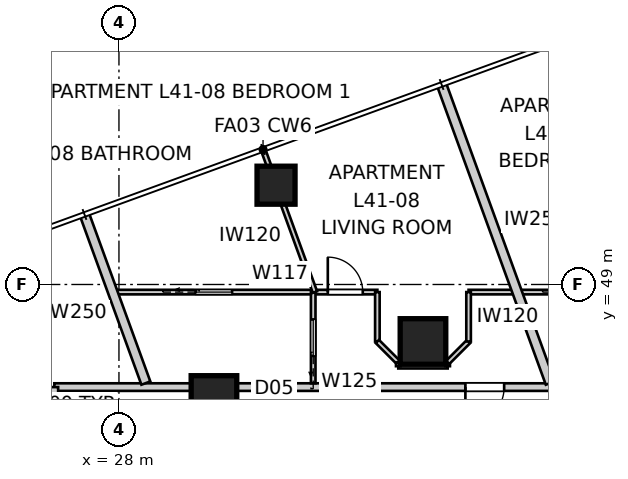
"""IFC4 building model, lengths in metres.
Left out: names, types, materials, properties, quantities, classifications, styles, units other than length and angle.
Written with IfcOpenShell. Run it as: python <this file> out.ifc"""

import sys

from ifc_helpers import new_model, si_unit, direction, frame, frame_2d, origin, origin_2d, place, context, subcontext, project, spatial, rectangle, extrude, element, fill, save


model = new_model("IFC4")
c1 = context("Model", 3, precision=1e-05, world=origin(), true_north=direction((0.0, 1.0)))
c2 = subcontext(c1, "Body", "Model", "MODEL_VIEW")
j1 = project(units=[si_unit("LENGTHUNIT", "METRE"), si_unit("PLANEANGLEUNIT", "RADIAN")], contexts=[c1])
p1 = place(None, origin())
s1 = spatial("IfcSite", under=j1, at=p1, CompositionType="ELEMENT")
p2 = place(p1, origin())
s2 = spatial("IfcBuilding", under=s1, at=p2, CompositionType="ELEMENT")
p3 = place(p2, frame((0.0, 0.0, 150.6)))
s3 = spatial("IfcBuildingStorey", under=s2, at=p3, CompositionType="ELEMENT", Elevation=150.6)
p4 = place(p3, frame((32.134, 51.613, 0.0), z_axis=(0.0, 0.0, 1.0), x_axis=(1.0, 0.0, 0.0)))
e1 = element("IfcColumn", 1, at=p4, inside=s3, PredefinedType="COLUMN", context=c2, shape_type="SweptSolid", body=[
    extrude(rectangle(XDim=1.0, YDim=1.0, at=origin_2d()), origin(), (0.0, 0.0, 1.0), 3.4),
])
for number, where, z_axis, x_axis in (
    (2, (36.0, 47.5, 0.0), (0.0, 0.0, 1.0), (1.0, 0.0, 0.0)),
    (3, (30.5, 46.0, 0.0), (0.0, 0.0, 1.0), (1.0, 0.0, 0.0)),
):
    element("IfcColumn", number, at=place(p3, frame(where, z_axis=z_axis, x_axis=x_axis)), inside=s3, PredefinedType="COLUMN", context=c2, shape_type="SweptSolid", body=[
        extrude(rectangle(XDim=1.2, YDim=1.2, at=origin_2d()), origin(), (0.0, 0.0, 1.0), 3.4),
    ])
p5 = place(p3, frame((47.558, 46.3, 0.0), z_axis=(0.0, 0.0, 1.0), x_axis=(-1.0, 0.0, 0.0)))
e4 = element("IfcWall", 4, at=p5, inside=s3, PredefinedType="PARTITIONING", context=c2, shape_type="SweptSolid", body=[
    extrude(rectangle(XDim=15.117, YDim=0.2, at=frame_2d((7.558, 0.0))), origin(), (0.0, 0.0, 1.0), 3.25),
])
p6 = place(p5, frame((9.422, 0.0, 0.0)))
e5 = element("IfcOpeningElement", 5, at=p6, cuts=e4, PredefinedType="OPENING", context=c2, shape_type="SweptSolid", body=[
    extrude(rectangle(XDim=1.02, YDim=2.34, at=frame_2d((0.51, 1.17))), frame((0.0, 0.11, 0.0), z_axis=(0.0, -1.0, 0.0), x_axis=(1.0, 0.0, 0.0)), (0.0, 0.0, 1.0), 0.22),
])
p7 = place(p3, frame((32.442, 46.3, 0.0), z_axis=(0.0, 0.0, 1.0), x_axis=(-1.0, 0.0, 0.0)))
e6 = element("IfcWall", 6, at=p7, inside=s3, PredefinedType="PARTITIONING", context=c2, shape_type="SweptSolid", body=[
    extrude(rectangle(XDim=1.683, YDim=0.2, at=frame_2d((0.842, 0.0))), origin(), (0.0, 0.0, 1.0), 2.55),
])
p8 = place(p3, frame((30.758, 46.3, 0.0), z_axis=(0.0, 0.0, 1.0), x_axis=(-1.0, 0.0, 0.0)))
e7 = element("IfcWall", 7, at=p8, inside=s3, PredefinedType="PARTITIONING", context=c2, shape_type="SweptSolid", body=[
    extrude(rectangle(XDim=4.458, YDim=0.2, at=frame_2d((2.229, 0.0))), origin(), (0.0, 0.0, 1.0), 3.25),
])
p9 = place(p3, frame((26.3, 46.3, 0.0), z_axis=(0.0, 0.0, 1.0), x_axis=(0.0, -1.0, 0.0)))
e8 = element("IfcWall", 8, at=p9, inside=s3, PredefinedType="PARTITIONING", context=c2, shape_type="SweptSolid", body=[
    extrude(rectangle(XDim=33.0, YDim=0.2, at=frame_2d((16.5, 0.0))), origin(), (0.0, 0.0, 1.0), 3.25),
])
p10 = place(p9, frame((13.229, 0.0, 0.0)))
e9 = element("IfcOpeningElement", 9, at=p10, cuts=e8, PredefinedType="OPENING", context=c2, shape_type="SweptSolid", body=[
    extrude(rectangle(XDim=1.02, YDim=2.34, at=frame_2d((0.51, 1.17))), frame((0.0, 0.11, 0.0), z_axis=(0.0, -1.0, 0.0), x_axis=(1.0, 0.0, 0.0)), (0.0, 0.0, 1.0), 0.22),
])
p11 = place(p9, frame((28.51, 0.0, 0.0)))
e10 = element("IfcOpeningElement", 10, at=p11, cuts=e8, PredefinedType="OPENING", context=c2, shape_type="SweptSolid", body=[
    extrude(rectangle(XDim=1.02, YDim=2.34, at=frame_2d((0.51, 1.17))), frame((0.0, 0.11, 0.0), z_axis=(0.0, -1.0, 0.0), x_axis=(1.0, 0.0, 0.0)), (0.0, 0.0, 1.0), 0.22),
])
p12 = place(p9, frame((1.998, 0.0, 0.0)))
e11 = element("IfcOpeningElement", 11, at=p12, cuts=e8, PredefinedType="OPENING", context=c2, shape_type="SweptSolid", body=[
    extrude(rectangle(XDim=1.02, YDim=2.34, at=frame_2d((0.51, 1.17))), frame((0.0, 0.11, 0.0), z_axis=(0.0, -1.0, 0.0), x_axis=(1.0, 0.0, 0.0)), (0.0, 0.0, 1.0), 0.22),
])
p13 = place(p3, frame((36.49, 54.263, 0.0), z_axis=(0.0, 0.0, 1.0), x_axis=(0.342019678743, -0.93969278988, 0.0)))
e12 = element("IfcWall", 12, at=p13, inside=s3, PredefinedType="PARTITIONING", context=c2, shape_type="SweptSolid", body=[
    extrude(rectangle(XDim=8.362, YDim=0.25, at=frame_2d((4.181, 0.0))), origin(), (0.0, 0.0, 1.0), 3.25),
])
p14 = place(p3, frame((27.093, 50.843, 0.0), z_axis=(0.0, 0.0, 1.0), x_axis=(0.342012883883, -0.939695262975, 0.0)))
e13 = element("IfcWall", 13, at=p14, inside=s3, PredefinedType="PARTITIONING", context=c2, shape_type="SweptSolid", body=[
    extrude(rectangle(XDim=4.722, YDim=0.25, at=frame_2d((2.361, 0.0))), origin(), (0.0, 0.0, 1.0), 3.25),
])
p15 = place(p3, frame((37.2, 48.8, 0.0), z_axis=(0.0, 0.0, 1.0), x_axis=(1.0, 0.0, 0.0)))
e14 = element("IfcWall", 14, at=p15, inside=s3, PredefinedType="PARTITIONING", context=c2, shape_type="SweptSolid", body=[
    extrude(rectangle(XDim=10.745, YDim=0.12, at=frame_2d((5.373, 0.0))), origin(), (0.0, 0.0, 1.0), 3.25),
])
p16 = place(p15, frame((8.165, 0.0, 0.0)))
e15 = element("IfcOpeningElement", 15, at=p16, cuts=e14, PredefinedType="OPENING", context=c2, shape_type="SweptSolid", body=[
    extrude(rectangle(XDim=0.96, YDim=2.1, at=frame_2d((0.48, 1.05))), frame((0.0, 0.07, 0.0), z_axis=(0.0, -1.0, 0.0), x_axis=(1.0, 0.0, 0.0)), (0.0, 0.0, 1.0), 0.14),
])
p17 = place(p15, frame((2.81, 0.0, 0.0)))
e16 = element("IfcOpeningElement", 16, at=p17, cuts=e14, PredefinedType="OPENING", context=c2, shape_type="SweptSolid", body=[
    extrude(rectangle(XDim=0.96, YDim=2.1, at=frame_2d((0.48, 1.05))), frame((0.0, 0.07, 0.0), z_axis=(0.0, -1.0, 0.0), x_axis=(1.0, 0.0, 0.0)), (0.0, 0.0, 1.0), 0.14),
])
p18 = place(p3, frame((27.836, 48.8, 0.0), z_axis=(0.0, 0.0, 1.0), x_axis=(1.0, 0.0, 0.0)))
e17 = element("IfcWall", 17, at=p18, inside=s3, PredefinedType="PARTITIONING", context=c2, shape_type="SweptSolid", body=[
    extrude(rectangle(XDim=6.964, YDim=0.12, at=frame_2d((3.482, 0.0))), origin(), (0.0, 0.0, 1.0), 3.25),
])
p19 = place(p18, frame((5.659, 0.0, 0.0)))
e18 = element("IfcOpeningElement", 18, at=p19, cuts=e17, PredefinedType="OPENING", context=c2, shape_type="SweptSolid", body=[
    extrude(rectangle(XDim=0.92, YDim=2.34, at=frame_2d((0.46, 1.17))), frame((0.0, 0.07, 0.0), z_axis=(0.0, -1.0, 0.0), x_axis=(1.0, 0.0, 0.0)), (0.0, 0.0, 1.0), 0.14),
])
p20 = place(p18, frame((2.18, 0.0, 0.0)))
e19 = element("IfcOpeningElement", 19, at=p20, cuts=e17, PredefinedType="OPENING", context=c2, shape_type="SweptSolid", body=[
    extrude(rectangle(XDim=0.96, YDim=2.1, at=frame_2d((0.48, 1.05))), frame((0.0, 0.07, 0.0), z_axis=(0.0, -1.0, 0.0), x_axis=(1.0, 0.0, 0.0)), (0.0, 0.0, 1.0), 0.14),
])
p21 = place(p3, frame((34.8, 48.8, 0.0), z_axis=(0.0, 0.0, 1.0), x_axis=(0.0, -1.0, 0.0)))
e20 = element("IfcWall", 20, at=p21, inside=s3, PredefinedType="PARTITIONING", context=c2, shape_type="SweptSolid", body=[
    extrude(rectangle(XDim=1.3, YDim=0.12, at=frame_2d((0.65, 0.0))), origin(), (0.0, 0.0, 1.0), 3.25),
])
p22 = place(p3, frame((34.8, 47.5, 0.0), z_axis=(0.0, 0.0, 1.0), x_axis=(0.707106781187, -0.707106781187, 0.0)))
e21 = element("IfcWall", 21, at=p22, inside=s3, PredefinedType="PARTITIONING", context=c2, shape_type="SweptSolid", body=[
    extrude(rectangle(XDim=0.778, YDim=0.12, at=frame_2d((0.389, 0.0))), origin(), (0.0, 0.0, 1.0), 3.25),
])
p23 = place(p3, frame((35.35, 46.85, 0.0), z_axis=(0.0, 0.0, 1.0), x_axis=(1.0, 0.0, 0.0)))
e22 = element("IfcWall", 22, at=p23, inside=s3, PredefinedType="PARTITIONING", context=c2, shape_type="SweptSolid", body=[
    extrude(rectangle(XDim=1.3, YDim=0.12, at=frame_2d((0.65, 0.0))), origin(), (0.0, 0.0, 1.0), 3.25),
])
p24 = place(p3, frame((36.65, 46.95, 0.0), z_axis=(0.0, 0.0, 1.0), x_axis=(0.707106781187, 0.707106781187, 0.0)))
e23 = element("IfcWall", 23, at=p24, inside=s3, PredefinedType="PARTITIONING", context=c2, shape_type="SweptSolid", body=[
    extrude(rectangle(XDim=0.778, YDim=0.12, at=frame_2d((0.389, 0.0))), origin(), (0.0, 0.0, 1.0), 3.25),
])
p25 = place(p3, frame((37.2, 47.5, 0.0), z_axis=(0.0, 0.0, 1.0), x_axis=(0.0, 1.0, 0.0)))
e24 = element("IfcWall", 24, at=p25, inside=s3, PredefinedType="PARTITIONING", context=c2, shape_type="SweptSolid", body=[
    extrude(rectangle(XDim=1.3, YDim=0.12, at=frame_2d((0.65, 0.0))), origin(), (0.0, 0.0, 1.0), 3.25),
])
p26 = place(p3, frame((33.112, 46.4, 0.0), z_axis=(0.0, 0.0, 1.0), x_axis=(0.0, 1.0, 0.0)))
e25 = element("IfcWall", 25, at=p26, inside=s3, PredefinedType="PARTITIONING", context=c2, shape_type="SweptSolid", body=[
    extrude(rectangle(XDim=2.4, YDim=0.12, at=frame_2d((1.2, 0.0))), origin(), (0.0, 0.0, 1.0), 3.25),
])
p27 = place(p26, frame((0.72, 0.0, 0.0)))
e26 = element("IfcOpeningElement", 26, at=p27, cuts=e25, PredefinedType="OPENING", context=c2, shape_type="SweptSolid", body=[
    extrude(rectangle(XDim=0.96, YDim=2.1, at=frame_2d((0.48, 1.05))), frame((0.0, 0.07, 0.0), z_axis=(0.0, -1.0, 0.0), x_axis=(1.0, 0.0, 0.0)), (0.0, 0.0, 1.0), 0.14),
])
p28 = place(p3, frame((33.157, 48.8, 0.0), z_axis=(0.0, 0.0, 1.0), x_axis=(-0.341990966768, 0.939703239672, 0.0)))
e27 = element("IfcWall", 27, at=p28, inside=s3, PredefinedType="PARTITIONING", context=c2, shape_type="SweptSolid", body=[
    extrude(rectangle(XDim=3.953, YDim=0.12, at=frame_2d((1.977, 0.0))), origin(), (0.0, 0.0, 1.0), 3.25),
])
for number, where, z_axis, x_axis in (
    (28, (35.35, 46.85, 0.0), (0.0, 0.0, 1.0), (0.0, 1.0, 0.0)),
    (29, (36.65, 46.85, 0.0), (0.0, 0.0, 1.0), (0.0, 1.0, 0.0)),
):
    element("IfcWall", number, at=place(p3, frame(where, z_axis=z_axis, x_axis=x_axis)), inside=s3, PredefinedType="PARTITIONING", context=c2, shape_type="SweptSolid", body=[
        extrude(rectangle(XDim=0.1, YDim=0.12, at=frame_2d((0.05, 0.0))), origin(), (0.0, 0.0, 1.0), 3.25),
    ])
p29 = place(p6, origin())
e30 = element("IfcDoor", 30, at=p29, inside=s3, OperationType="SINGLE_SWING_RIGHT", PredefinedType="DOOR", context=c2, shape_type="SweptSolid", body=[
    extrude(rectangle(XDim=1.02, YDim=2.34, at=frame_2d((0.51, 1.17))), frame((0.0, 0.025, 0.0), z_axis=(0.0, -1.0, 0.0), x_axis=(1.0, 0.0, 0.0)), (0.0, 0.0, 1.0), 0.05),
])
fill(e5, e30)
p30 = place(p27, origin())
e31 = element("IfcDoor", 31, at=p30, inside=s3, OperationType="SLIDING_TO_LEFT", PredefinedType="DOOR", context=c2, shape_type="SweptSolid", body=[
    extrude(rectangle(XDim=0.96, YDim=2.1, at=frame_2d((0.48, 1.05))), frame((0.0, 0.025, 0.0), z_axis=(0.0, -1.0, 0.0), x_axis=(1.0, 0.0, 0.0)), (0.0, 0.0, 1.0), 0.05),
])
fill(e26, e31)
p31 = place(p19, origin())
e32 = element("IfcDoor", 32, at=p31, inside=s3, OperationType="SINGLE_SWING_LEFT", PredefinedType="DOOR", context=c2, shape_type="SweptSolid", body=[
    extrude(rectangle(XDim=0.92, YDim=2.34, at=frame_2d((0.46, 1.17))), frame((0.0, 0.025, 0.0), z_axis=(0.0, -1.0, 0.0), x_axis=(1.0, 0.0, 0.0)), (0.0, 0.0, 1.0), 0.05),
])
fill(e18, e32)
p32 = place(p20, origin())
e33 = element("IfcDoor", 33, at=p32, inside=s3, OperationType="SLIDING_TO_LEFT", PredefinedType="DOOR", context=c2, shape_type="SweptSolid", body=[
    extrude(rectangle(XDim=0.96, YDim=2.1, at=frame_2d((0.48, 1.05))), frame((0.0, 0.025, 0.0), z_axis=(0.0, -1.0, 0.0), x_axis=(1.0, 0.0, 0.0)), (0.0, 0.0, 1.0), 0.05),
])
fill(e19, e33)
save(model, sys.argv[1])
